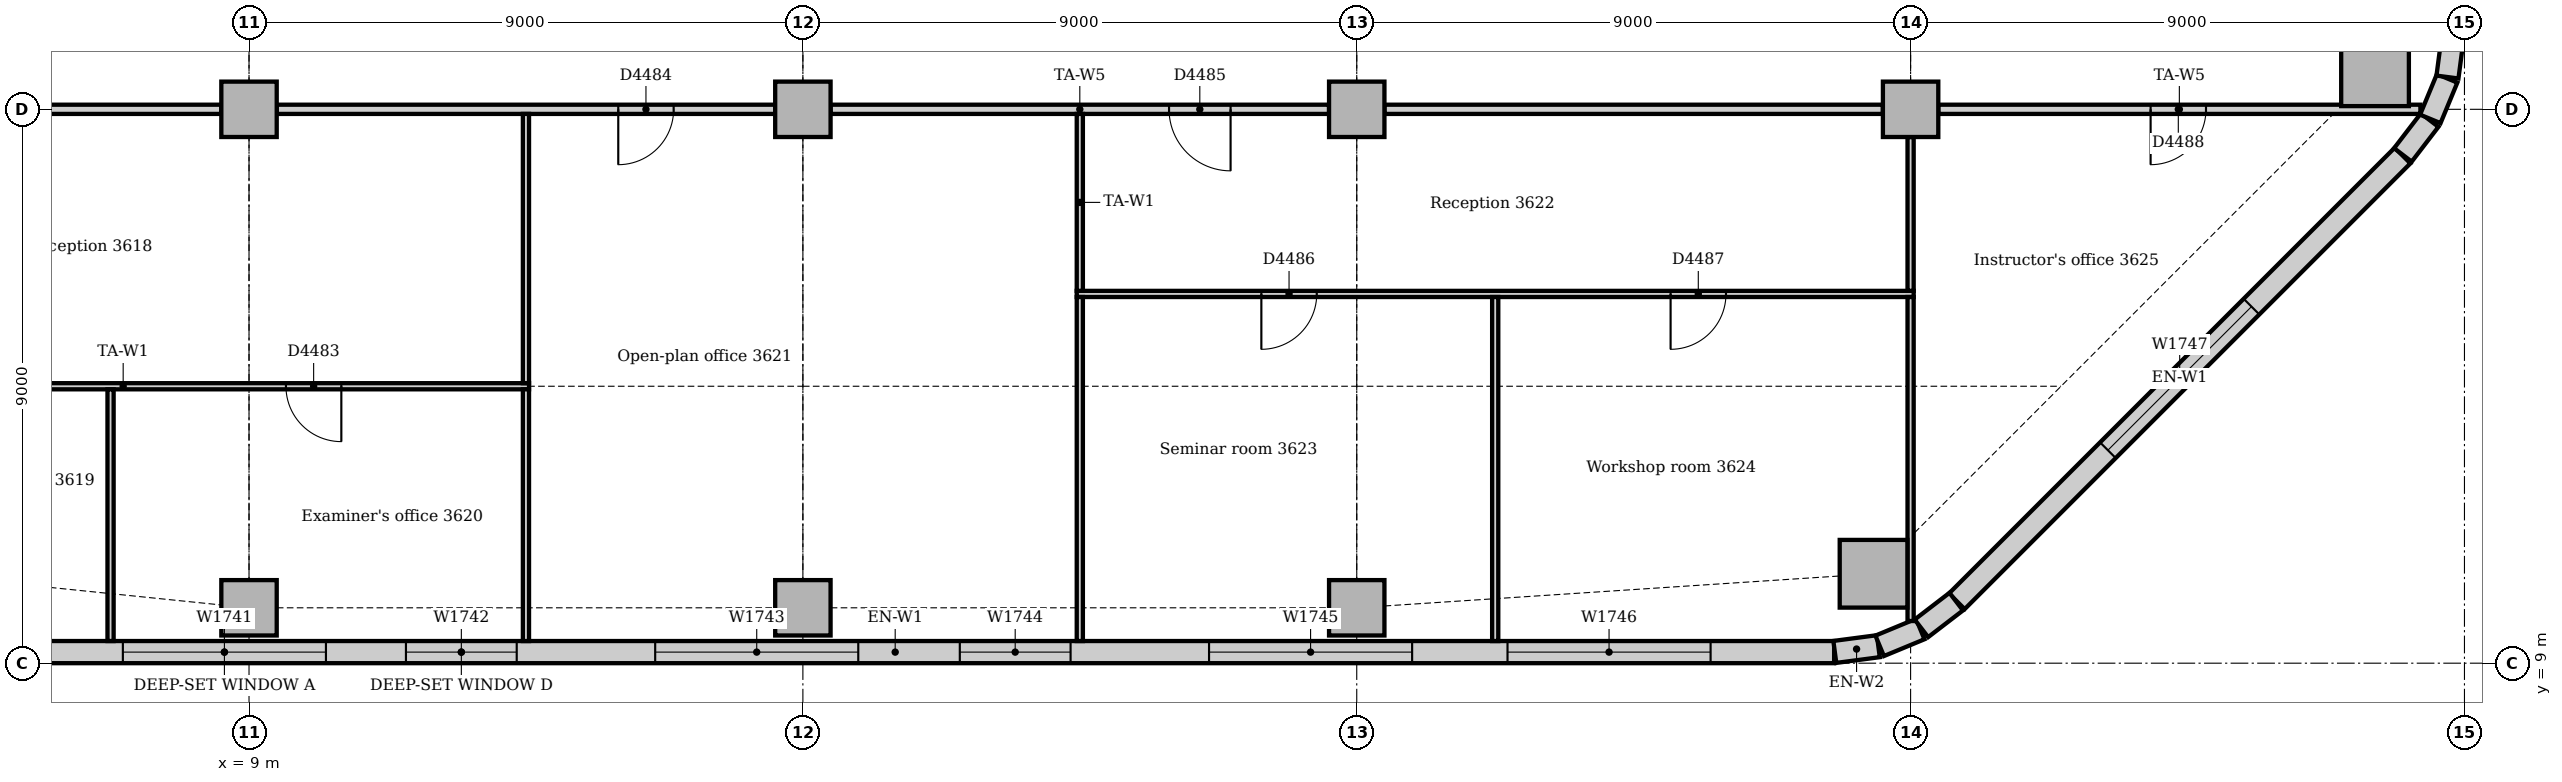
"""IFC4 building model, lengths in metres.
Left out: names, types, materials, properties, quantities, classifications, styles, units other than length and angle.
Written with IfcOpenShell. Run it as: python <this file> out.ifc"""

import sys

from ifc_helpers import new_model, si_unit, direction, frame, frame_2d, origin, origin_2d, place, context, subcontext, project, spatial, rectangle, extrude, element, fill, save


model = new_model("IFC4")
c1 = context("Model", 3, precision=1e-05, world=origin(), true_north=direction((0.0, 1.0)))
c2 = subcontext(c1, "Body", "Model", "MODEL_VIEW")
j1 = project(units=[si_unit("LENGTHUNIT", "METRE"), si_unit("PLANEANGLEUNIT", "RADIAN")], contexts=[c1])
p1 = place(None, origin())
s1 = spatial("IfcSite", under=j1, at=p1, CompositionType="ELEMENT")
p2 = place(p1, origin())
s2 = spatial("IfcBuilding", under=s1, at=p2, CompositionType="ELEMENT")
p3 = place(p2, frame((0.0, 0.0, 153.0)))
s3 = spatial("IfcBuildingStorey", under=s2, at=p3, CompositionType="ELEMENT", Elevation=153.0)
for number, where, z_axis, x_axis in (
    (1, (35.398, 10.453, 0.0), (0.0, 0.0, 1.0), (1.0, 0.0, 0.0)),
    (2, (43.547, 18.602, 0.0), (0.0, 0.0, 1.0), (1.0, 0.0, 0.0)),
):
    element("IfcColumn", number, at=place(p3, frame(where, z_axis=z_axis, x_axis=x_axis)), inside=s3, PredefinedType="COLUMN", context=c2, shape_type="SweptSolid", body=[
        extrude(rectangle(XDim=1.1, YDim=1.1, at=origin_2d()), origin(), (0.0, 0.0, 1.0), 3.85),
    ])
for number, where, z_axis, x_axis in (
    (3, (9.0, 9.9, 0.0), (0.0, 0.0, 1.0), (1.0, 0.0, 0.0)),
    (4, (18.0, 9.9, 0.0), (0.0, 0.0, 1.0), (1.0, 0.0, 0.0)),
    (5, (27.0, 9.9, 0.0), (0.0, 0.0, 1.0), (1.0, 0.0, 0.0)),
    (6, (9.0, 18.0, 0.0), (0.0, 0.0, 1.0), (1.0, 0.0, 0.0)),
    (7, (18.0, 18.0, 0.0), (0.0, 0.0, 1.0), (1.0, 0.0, 0.0)),
    (8, (27.0, 18.0, 0.0), (0.0, 0.0, 1.0), (1.0, 0.0, 0.0)),
    (9, (36.0, 18.0, 0.0), (0.0, 0.0, 1.0), (1.0, 0.0, 0.0)),
):
    element("IfcColumn", number, at=place(p3, frame(where, z_axis=z_axis, x_axis=x_axis)), inside=s3, PredefinedType="COLUMN", context=c2, shape_type="SweptSolid", body=[
        extrude(rectangle(XDim=0.9, YDim=0.9, at=origin_2d()), origin(), (0.0, 0.0, 1.0), 3.85),
    ])
p4 = place(p3, frame((4.243, 9.18, 0.0), z_axis=(0.0, 0.0, 1.0), x_axis=(1.0, 0.0, 0.0)))
e10 = element("IfcWall", 10, at=p4, inside=s3, PredefinedType="STANDARD", context=c2, shape_type="SweptSolid", body=[
    extrude(rectangle(XDim=30.515, YDim=0.36, at=frame_2d((15.257, 0.0))), origin(), (0.0, 0.0, 1.0), 3.85),
])
p5 = place(p4, frame((2.707, 0.0, 0.9)))
e11 = element("IfcOpeningElement", 11, at=p5, cuts=e10, PredefinedType="OPENING", context=c2, shape_type="SweptSolid", body=[
    extrude(rectangle(XDim=3.3, YDim=1.6, at=frame_2d((1.65, 0.8))), frame((0.0, 0.19, 0.0), z_axis=(0.0, -1.0, 0.0), x_axis=(1.0, 0.0, 0.0)), (0.0, 0.0, 1.0), 0.38),
])
p6 = place(p4, frame((7.307, 0.0, 0.9)))
e12 = element("IfcOpeningElement", 12, at=p6, cuts=e10, PredefinedType="OPENING", context=c2, shape_type="SweptSolid", body=[
    extrude(rectangle(XDim=1.8, YDim=1.6, at=frame_2d((0.9, 0.8))), frame((0.0, 0.19, 0.0), z_axis=(0.0, -1.0, 0.0), x_axis=(1.0, 0.0, 0.0)), (0.0, 0.0, 1.0), 0.38),
])
p7 = place(p4, frame((11.357, 0.0, 0.9)))
e13 = element("IfcOpeningElement", 13, at=p7, cuts=e10, PredefinedType="OPENING", context=c2, shape_type="SweptSolid", body=[
    extrude(rectangle(XDim=3.3, YDim=1.6, at=frame_2d((1.65, 0.8))), frame((0.0, 0.19, 0.0), z_axis=(0.0, -1.0, 0.0), x_axis=(1.0, 0.0, 0.0)), (0.0, 0.0, 1.0), 0.38),
])
p8 = place(p4, frame((16.307, 0.0, 0.9)))
e14 = element("IfcOpeningElement", 14, at=p8, cuts=e10, PredefinedType="OPENING", context=c2, shape_type="SweptSolid", body=[
    extrude(rectangle(XDim=1.8, YDim=1.6, at=frame_2d((0.9, 0.8))), frame((0.0, 0.19, 0.0), z_axis=(0.0, -1.0, 0.0), x_axis=(1.0, 0.0, 0.0)), (0.0, 0.0, 1.0), 0.38),
])
p9 = place(p4, frame((20.357, 0.0, 0.9)))
e15 = element("IfcOpeningElement", 15, at=p9, cuts=e10, PredefinedType="OPENING", context=c2, shape_type="SweptSolid", body=[
    extrude(rectangle(XDim=3.3, YDim=1.6, at=frame_2d((1.65, 0.8))), frame((0.0, 0.19, 0.0), z_axis=(0.0, -1.0, 0.0), x_axis=(1.0, 0.0, 0.0)), (0.0, 0.0, 1.0), 0.38),
])
p10 = place(p4, frame((25.207, 0.0, 0.9)))
e16 = element("IfcOpeningElement", 16, at=p10, cuts=e10, PredefinedType="OPENING", context=c2, shape_type="SweptSolid", body=[
    extrude(rectangle(XDim=3.3, YDim=1.6, at=frame_2d((1.65, 0.8))), frame((0.0, 0.19, 0.0), z_axis=(0.0, -1.0, 0.0), x_axis=(1.0, 0.0, 0.0)), (0.0, 0.0, 1.0), 0.38),
])
p11 = place(p3, frame((36.751, 10.006, 0.0), z_axis=(0.0, 0.0, 1.0), x_axis=(0.707106781187, 0.707106781187, 0.0)))
e17 = element("IfcWall", 17, at=p11, inside=s3, PredefinedType="STANDARD", context=c2, shape_type="SweptSolid", body=[
    extrude(rectangle(XDim=10.243, YDim=0.36, at=frame_2d((5.121, 0.0))), origin(), (0.0, 0.0, 1.0), 3.85),
])
p12 = place(p11, frame((3.471, 0.0, 0.9)))
e18 = element("IfcOpeningElement", 18, at=p12, cuts=e17, PredefinedType="OPENING", context=c2, shape_type="SweptSolid", body=[
    extrude(rectangle(XDim=3.3, YDim=1.6, at=frame_2d((1.65, 0.8))), frame((0.0, 0.19, 0.0), z_axis=(0.0, -1.0, 0.0), x_axis=(1.0, 0.0, 0.0)), (0.0, 0.0, 1.0), 0.38),
])
for number, where, z_axis, x_axis in (
    (19, (34.769, 9.183, 0.0), (0.0, 0.0, 1.0), (0.991, 0.131, 0.0)),
    (20, (35.497, 9.282, 0.0), (0.0, 0.0, 1.0), (0.924, 0.383, 0.0)),
):
    element("IfcWall", number, at=place(p3, frame(where, z_axis=z_axis, x_axis=x_axis)), inside=s3, PredefinedType="STANDARD", context=c2, shape_type="SweptSolid", body=[
        extrude(rectangle(XDim=0.713, YDim=0.36, at=frame_2d((0.356, 0.0))), origin(), (0.0, 0.0, 1.0), 3.85),
    ])
for number, where, z_axis, x_axis in (
    (21, (36.175, 9.566, 0.0), (0.0, 0.0, 1.0), (0.793, 0.609, 0.0)),
    (22, (44.0, 17.259, 0.0), (0.0, 0.0, 1.0), (0.609, 0.793, 0.0)),
):
    element("IfcWall", number, at=place(p3, frame(where, z_axis=z_axis, x_axis=x_axis)), inside=s3, PredefinedType="STANDARD", context=c2, shape_type="SweptSolid", body=[
        extrude(rectangle(XDim=0.713, YDim=0.36, at=frame_2d((0.357, 0.0))), origin(), (0.0, 0.0, 1.0), 3.85),
    ])
for number, where, z_axis, x_axis in (
    (23, (44.445, 17.844, 0.0), (0.0, 0.0, 1.0), (0.383, 0.924, 0.0)),
    (24, (44.724, 18.524, 0.0), (0.0, 0.0, 1.0), (0.131, 0.991, 0.0)),
):
    element("IfcWall", number, at=place(p3, frame(where, z_axis=z_axis, x_axis=x_axis)), inside=s3, PredefinedType="STANDARD", context=c2, shape_type="SweptSolid", body=[
        extrude(rectangle(XDim=0.713, YDim=0.36, at=frame_2d((0.356, 0.0))), origin(), (0.0, 0.0, 1.0), 3.85),
    ])
p13 = place(p3, frame((1.35, 18.0, 0.0), z_axis=(0.0, 0.0, 1.0), x_axis=(1.0, 0.0, 0.0)))
e25 = element("IfcWall", 25, at=p13, inside=s3, PredefinedType="PARTITIONING", context=c2, shape_type="SweptSolid", body=[
    extrude(rectangle(XDim=7.2, YDim=0.15, at=frame_2d((3.6, 0.0))), origin(), (0.0, 0.0, 1.0), 3.262),
])
p14 = place(p13, frame((3.1, 0.0, 0.0)))
e26 = element("IfcOpeningElement", 26, at=p14, cuts=e25, PredefinedType="OPENING", context=c2, shape_type="SweptSolid", body=[
    extrude(rectangle(XDim=1.0, YDim=2.1, at=frame_2d((0.5, 1.05))), frame((0.0, 0.085, 0.0), z_axis=(0.0, -1.0, 0.0), x_axis=(1.0, 0.0, 0.0)), (0.0, 0.0, 1.0), 0.17),
])
p15 = place(p3, frame((9.45, 18.0, 0.0), z_axis=(0.0, 0.0, 1.0), x_axis=(1.0, 0.0, 0.0)))
e27 = element("IfcWall", 27, at=p15, inside=s3, PredefinedType="PARTITIONING", context=c2, shape_type="SweptSolid", body=[
    extrude(rectangle(XDim=8.1, YDim=0.15, at=frame_2d((4.05, 0.0))), origin(), (0.0, 0.0, 1.0), 3.262),
])
p16 = place(p15, frame((5.55, 0.0, 0.0)))
e28 = element("IfcOpeningElement", 28, at=p16, cuts=e27, PredefinedType="OPENING", context=c2, shape_type="SweptSolid", body=[
    extrude(rectangle(XDim=0.9, YDim=2.1, at=frame_2d((0.45, 1.05))), frame((0.0, 0.085, 0.0), z_axis=(0.0, -1.0, 0.0), x_axis=(1.0, 0.0, 0.0)), (0.0, 0.0, 1.0), 0.17),
])
p17 = place(p3, frame((18.45, 18.0, 0.0), z_axis=(0.0, 0.0, 1.0), x_axis=(1.0, 0.0, 0.0)))
e29 = element("IfcWall", 29, at=p17, inside=s3, PredefinedType="PARTITIONING", context=c2, shape_type="SweptSolid", body=[
    extrude(rectangle(XDim=8.1, YDim=0.15, at=frame_2d((4.05, 0.0))), origin(), (0.0, 0.0, 1.0), 3.262),
])
p18 = place(p17, frame((5.5, 0.0, 0.0)))
e30 = element("IfcOpeningElement", 30, at=p18, cuts=e29, PredefinedType="OPENING", context=c2, shape_type="SweptSolid", body=[
    extrude(rectangle(XDim=1.0, YDim=2.1, at=frame_2d((0.5, 1.05))), frame((0.0, 0.085, 0.0), z_axis=(0.0, -1.0, 0.0), x_axis=(1.0, 0.0, 0.0)), (0.0, 0.0, 1.0), 0.17),
])
p19 = place(p3, frame((27.45, 18.0, 0.0), z_axis=(0.0, 0.0, 1.0), x_axis=(1.0, 0.0, 0.0)))
e31 = element("IfcWall", 31, at=p19, inside=s3, PredefinedType="PARTITIONING", context=c2, shape_type="SweptSolid", body=[
    extrude(rectangle(XDim=8.1, YDim=0.15, at=frame_2d((4.05, 0.0))), origin(), (0.0, 0.0, 1.0), 3.262),
])
p20 = place(p3, frame((36.45, 18.0, 0.0), z_axis=(0.0, 0.0, 1.0), x_axis=(1.0, 0.0, 0.0)))
e32 = element("IfcWall", 32, at=p20, inside=s3, PredefinedType="PARTITIONING", context=c2, shape_type="SweptSolid", body=[
    extrude(rectangle(XDim=7.834, YDim=0.15, at=frame_2d((3.917, 0.0))), origin(), (0.0, 0.0, 1.0), 3.35),
])
p21 = place(p20, frame((3.45, 0.0, 0.0)))
e33 = element("IfcOpeningElement", 33, at=p21, cuts=e32, PredefinedType="OPENING", context=c2, shape_type="SweptSolid", body=[
    extrude(rectangle(XDim=0.9, YDim=2.1, at=frame_2d((0.45, 1.05))), frame((0.0, 0.085, 0.0), z_axis=(0.0, -1.0, 0.0), x_axis=(1.0, 0.0, 0.0)), (0.0, 0.0, 1.0), 0.17),
])
p22 = place(p3, frame((22.45, 15.0, 0.0), z_axis=(0.0, 0.0, 1.0), x_axis=(1.0, 0.0, 0.0)))
e34 = element("IfcWall", 34, at=p22, inside=s3, PredefinedType="PARTITIONING", context=c2, shape_type="SweptSolid", body=[
    extrude(rectangle(XDim=13.6, YDim=0.1, at=frame_2d((6.8, 0.0))), origin(), (0.0, 0.0, 1.0), 3.85),
])
p23 = place(p22, frame((3.0, 0.0, 0.0)))
e35 = element("IfcOpeningElement", 35, at=p23, cuts=e34, PredefinedType="OPENING", context=c2, shape_type="SweptSolid", body=[
    extrude(rectangle(XDim=0.9, YDim=2.1, at=frame_2d((0.45, 1.05))), frame((0.0, 0.06, 0.0), z_axis=(0.0, -1.0, 0.0), x_axis=(1.0, 0.0, 0.0)), (0.0, 0.0, 1.0), 0.12),
])
p24 = place(p22, frame((9.65, 0.0, 0.0)))
e36 = element("IfcOpeningElement", 36, at=p24, cuts=e34, PredefinedType="OPENING", context=c2, shape_type="SweptSolid", body=[
    extrude(rectangle(XDim=0.9, YDim=2.1, at=frame_2d((0.45, 1.05))), frame((0.0, 0.06, 0.0), z_axis=(0.0, -1.0, 0.0), x_axis=(1.0, 0.0, 0.0)), (0.0, 0.0, 1.0), 0.12),
])
p25 = place(p3, frame((0.36, 13.5, 0.0), z_axis=(0.0, 0.0, 1.0), x_axis=(1.0, 0.0, 0.0)))
e37 = element("IfcWall", 37, at=p25, inside=s3, PredefinedType="PARTITIONING", context=c2, shape_type="SweptSolid", body=[
    extrude(rectangle(XDim=13.19, YDim=0.1, at=frame_2d((6.595, 0.0))), origin(), (0.0, 0.0, 1.0), 3.4),
])
p26 = place(p25, frame((2.8, 0.0, 0.0)))
e38 = element("IfcOpeningElement", 38, at=p26, cuts=e37, PredefinedType="OPENING", context=c2, shape_type="SweptSolid", body=[
    extrude(rectangle(XDim=0.9, YDim=2.1, at=frame_2d((0.45, 1.05))), frame((0.0, 0.06, 0.0), z_axis=(0.0, -1.0, 0.0), x_axis=(1.0, 0.0, 0.0)), (0.0, 0.0, 1.0), 0.12),
])
p27 = place(p25, frame((9.24, 0.0, 0.0)))
e39 = element("IfcOpeningElement", 39, at=p27, cuts=e37, PredefinedType="OPENING", context=c2, shape_type="SweptSolid", body=[
    extrude(rectangle(XDim=0.9, YDim=2.1, at=frame_2d((0.45, 1.05))), frame((0.0, 0.06, 0.0), z_axis=(0.0, -1.0, 0.0), x_axis=(1.0, 0.0, 0.0)), (0.0, 0.0, 1.0), 0.12),
])
p28 = place(p3, frame((13.5, 13.55, 0.0), z_axis=(0.0, 0.0, 1.0), x_axis=(0.0, 1.0, 0.0)))
e40 = element("IfcWall", 40, at=p28, inside=s3, PredefinedType="PARTITIONING", context=c2, shape_type="SweptSolid", body=[
    extrude(rectangle(XDim=4.375, YDim=0.1, at=frame_2d((2.188, 0.0))), origin(), (0.0, 0.0, 1.0), 3.85),
])
p29 = place(p3, frame((13.5, 9.36, 0.0), z_axis=(0.0, 0.0, 1.0), x_axis=(0.0, 1.0, 0.0)))
e41 = element("IfcWall", 41, at=p29, inside=s3, PredefinedType="PARTITIONING", context=c2, shape_type="SweptSolid", body=[
    extrude(rectangle(XDim=4.09, YDim=0.1, at=frame_2d((2.045, 0.0))), origin(), (0.0, 0.0, 1.0), 3.85),
])
p30 = place(p3, frame((22.5, 15.05, 0.0), z_axis=(0.0, 0.0, 1.0), x_axis=(0.0, 1.0, 0.0)))
e42 = element("IfcWall", 42, at=p30, inside=s3, PredefinedType="PARTITIONING", context=c2, shape_type="SweptSolid", body=[
    extrude(rectangle(XDim=2.875, YDim=0.1, at=frame_2d((1.438, 0.0))), origin(), (0.0, 0.0, 1.0), 3.85),
])
p31 = place(p3, frame((22.5, 9.36, 0.0), z_axis=(0.0, 0.0, 1.0), x_axis=(0.0, 1.0, 0.0)))
e43 = element("IfcWall", 43, at=p31, inside=s3, PredefinedType="PARTITIONING", context=c2, shape_type="SweptSolid", body=[
    extrude(rectangle(XDim=5.59, YDim=0.1, at=frame_2d((2.795, 0.0))), origin(), (0.0, 0.0, 1.0), 3.85),
])
p32 = place(p3, frame((36.0, 15.05, 0.0), z_axis=(0.0, 0.0, 1.0), x_axis=(0.0, 1.0, 0.0)))
e44 = element("IfcWall", 44, at=p32, inside=s3, PredefinedType="PARTITIONING", context=c2, shape_type="SweptSolid", body=[
    extrude(rectangle(XDim=2.5, YDim=0.1, at=frame_2d((1.25, 0.0))), origin(), (0.0, 0.0, 1.0), 3.35),
])
p33 = place(p3, frame((36.0, 9.685, 0.0), z_axis=(0.0, 0.0, 1.0), x_axis=(0.0, 1.0, 0.0)))
e45 = element("IfcWall", 45, at=p33, inside=s3, PredefinedType="PARTITIONING", context=c2, shape_type="SweptSolid", body=[
    extrude(rectangle(XDim=5.265, YDim=0.1, at=frame_2d((2.632, 0.0))), origin(), (0.0, 0.0, 1.0), 3.35),
])
p34 = place(p3, frame((29.25, 9.36, 0.0), z_axis=(0.0, 0.0, 1.0), x_axis=(0.0, 1.0, 0.0)))
e46 = element("IfcWall", 46, at=p34, inside=s3, PredefinedType="PARTITIONING", context=c2, shape_type="SweptSolid", body=[
    extrude(rectangle(XDim=5.59, YDim=0.1, at=frame_2d((2.795, 0.0))), origin(), (0.0, 0.0, 1.0), 3.85),
])
p35 = place(p3, frame((6.75, 9.36, 0.0), z_axis=(0.0, 0.0, 1.0), x_axis=(0.0, 1.0, 0.0)))
e47 = element("IfcWall", 47, at=p35, inside=s3, PredefinedType="PARTITIONING", context=c2, shape_type="SweptSolid", body=[
    extrude(rectangle(XDim=4.09, YDim=0.1, at=frame_2d((2.045, 0.0))), origin(), (0.0, 0.0, 1.0), 3.85),
])
p36 = place(p5, origin())
e48 = element("IfcWindow", 48, at=p36, inside=s3, PartitioningType="SINGLE_PANEL", PredefinedType="WINDOW", context=c2, shape_type="SweptSolid", body=[
    extrude(rectangle(XDim=3.3, YDim=1.6, at=frame_2d((1.65, 0.8))), frame((0.0, 0.13, 0.0), z_axis=(0.0, -1.0, 0.0), x_axis=(1.0, 0.0, 0.0)), (0.0, 0.0, 1.0), 0.06),
])
fill(e11, e48)
p37 = place(p6, origin())
e49 = element("IfcWindow", 49, at=p37, inside=s3, PartitioningType="SINGLE_PANEL", PredefinedType="WINDOW", context=c2, shape_type="SweptSolid", body=[
    extrude(rectangle(XDim=1.8, YDim=1.6, at=frame_2d((0.9, 0.8))), frame((0.0, 0.13, 0.0), z_axis=(0.0, -1.0, 0.0), x_axis=(1.0, 0.0, 0.0)), (0.0, 0.0, 1.0), 0.06),
])
fill(e12, e49)
p38 = place(p7, origin())
e50 = element("IfcWindow", 50, at=p38, inside=s3, PartitioningType="SINGLE_PANEL", PredefinedType="WINDOW", context=c2, shape_type="SweptSolid", body=[
    extrude(rectangle(XDim=3.3, YDim=1.6, at=frame_2d((1.65, 0.8))), frame((0.0, 0.13, 0.0), z_axis=(0.0, -1.0, 0.0), x_axis=(1.0, 0.0, 0.0)), (0.0, 0.0, 1.0), 0.06),
])
fill(e13, e50)
p39 = place(p8, origin())
e51 = element("IfcWindow", 51, at=p39, inside=s3, PartitioningType="SINGLE_PANEL", PredefinedType="WINDOW", context=c2, shape_type="SweptSolid", body=[
    extrude(rectangle(XDim=1.8, YDim=1.6, at=frame_2d((0.9, 0.8))), frame((0.0, 0.13, 0.0), z_axis=(0.0, -1.0, 0.0), x_axis=(1.0, 0.0, 0.0)), (0.0, 0.0, 1.0), 0.06),
])
fill(e14, e51)
p40 = place(p9, origin())
e52 = element("IfcWindow", 52, at=p40, inside=s3, PartitioningType="SINGLE_PANEL", PredefinedType="WINDOW", context=c2, shape_type="SweptSolid", body=[
    extrude(rectangle(XDim=3.3, YDim=1.6, at=frame_2d((1.65, 0.8))), frame((0.0, 0.13, 0.0), z_axis=(0.0, -1.0, 0.0), x_axis=(1.0, 0.0, 0.0)), (0.0, 0.0, 1.0), 0.06),
])
fill(e15, e52)
p41 = place(p10, origin())
e53 = element("IfcWindow", 53, at=p41, inside=s3, PartitioningType="SINGLE_PANEL", PredefinedType="WINDOW", context=c2, shape_type="SweptSolid", body=[
    extrude(rectangle(XDim=3.3, YDim=1.6, at=frame_2d((1.65, 0.8))), frame((0.0, 0.13, 0.0), z_axis=(0.0, -1.0, 0.0), x_axis=(1.0, 0.0, 0.0)), (0.0, 0.0, 1.0), 0.06),
])
fill(e16, e53)
p42 = place(p12, origin())
e54 = element("IfcWindow", 54, at=p42, inside=s3, PartitioningType="SINGLE_PANEL", PredefinedType="WINDOW", context=c2, shape_type="SweptSolid", body=[
    extrude(rectangle(XDim=3.3, YDim=1.6, at=frame_2d((1.65, 0.8))), frame((0.0, 0.13, 0.0), z_axis=(0.0, -1.0, 0.0), x_axis=(1.0, 0.0, 0.0)), (0.0, 0.0, 1.0), 0.06),
])
fill(e18, e54)
p43 = place(p27, frame((0.9, 0.0, 0.0), z_axis=(0.0, 0.0, 1.0), x_axis=(-1.0, 0.0, 0.0)))
e55 = element("IfcDoor", 55, at=p43, inside=s3, OperationType="SINGLE_SWING_LEFT", PredefinedType="DOOR", context=c2, shape_type="SweptSolid", body=[
    extrude(rectangle(XDim=0.9, YDim=2.1, at=frame_2d((0.45, 1.05))), frame((0.0, 0.025, 0.0), z_axis=(0.0, -1.0, 0.0), x_axis=(1.0, 0.0, 0.0)), (0.0, 0.0, 1.0), 0.05),
])
fill(e39, e55)
p44 = place(p16, frame((0.9, 0.0, 0.0), z_axis=(0.0, 0.0, 1.0), x_axis=(-1.0, 0.0, 0.0)))
e56 = element("IfcDoor", 56, at=p44, inside=s3, OperationType="SINGLE_SWING_RIGHT", PredefinedType="DOOR", context=c2, shape_type="SweptSolid", body=[
    extrude(rectangle(XDim=0.9, YDim=2.1, at=frame_2d((0.45, 1.05))), frame((0.0, 0.025, 0.0), z_axis=(0.0, -1.0, 0.0), x_axis=(1.0, 0.0, 0.0)), (0.0, 0.0, 1.0), 0.05),
])
fill(e28, e56)
p45 = place(p18, frame((1.0, 0.0, 0.0), z_axis=(0.0, 0.0, 1.0), x_axis=(-1.0, 0.0, 0.0)))
e57 = element("IfcDoor", 57, at=p45, inside=s3, OperationType="SINGLE_SWING_LEFT", PredefinedType="DOOR", context=c2, shape_type="SweptSolid", body=[
    extrude(rectangle(XDim=1.0, YDim=2.1, at=frame_2d((0.5, 1.05))), frame((0.0, 0.025, 0.0), z_axis=(0.0, -1.0, 0.0), x_axis=(1.0, 0.0, 0.0)), (0.0, 0.0, 1.0), 0.05),
])
fill(e30, e57)
p46 = place(p23, frame((0.9, 0.0, 0.0), z_axis=(0.0, 0.0, 1.0), x_axis=(-1.0, 0.0, 0.0)))
e58 = element("IfcDoor", 58, at=p46, inside=s3, OperationType="SINGLE_SWING_RIGHT", PredefinedType="DOOR", context=c2, shape_type="SweptSolid", body=[
    extrude(rectangle(XDim=0.9, YDim=2.1, at=frame_2d((0.45, 1.05))), frame((0.0, 0.025, 0.0), z_axis=(0.0, -1.0, 0.0), x_axis=(1.0, 0.0, 0.0)), (0.0, 0.0, 1.0), 0.05),
])
fill(e35, e58)
p47 = place(p24, frame((0.9, 0.0, 0.0), z_axis=(0.0, 0.0, 1.0), x_axis=(-1.0, 0.0, 0.0)))
e59 = element("IfcDoor", 59, at=p47, inside=s3, OperationType="SINGLE_SWING_RIGHT", PredefinedType="DOOR", context=c2, shape_type="SweptSolid", body=[
    extrude(rectangle(XDim=0.9, YDim=2.1, at=frame_2d((0.45, 1.05))), frame((0.0, 0.025, 0.0), z_axis=(0.0, -1.0, 0.0), x_axis=(1.0, 0.0, 0.0)), (0.0, 0.0, 1.0), 0.05),
])
fill(e36, e59)
p48 = place(p21, frame((0.9, 0.0, 0.0), z_axis=(0.0, 0.0, 1.0), x_axis=(-1.0, 0.0, 0.0)))
e60 = element("IfcDoor", 60, at=p48, inside=s3, OperationType="SINGLE_SWING_RIGHT", PredefinedType="DOOR", context=c2, shape_type="SweptSolid", body=[
    extrude(rectangle(XDim=0.9, YDim=2.1, at=frame_2d((0.45, 1.05))), frame((0.0, 0.025, 0.0), z_axis=(0.0, -1.0, 0.0), x_axis=(1.0, 0.0, 0.0)), (0.0, 0.0, 1.0), 0.05),
])
fill(e33, e60)
save(model, sys.argv[1])
